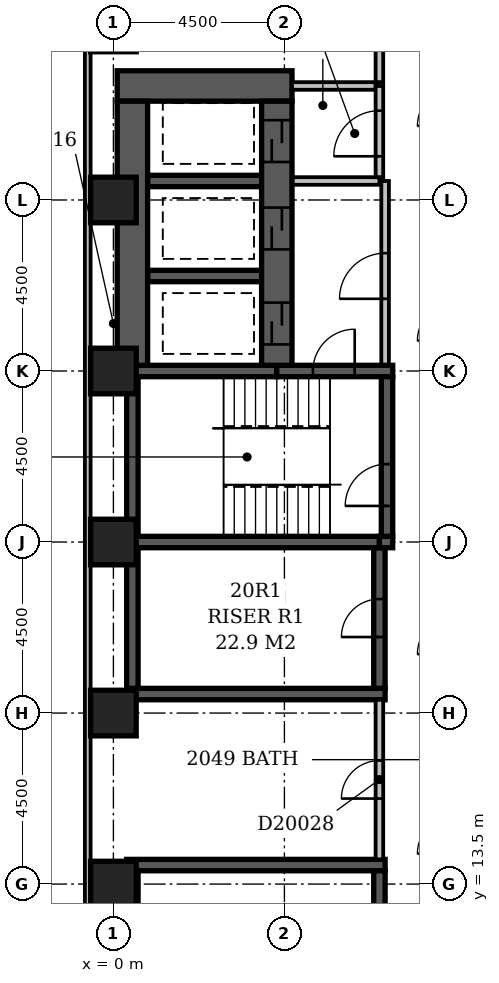
"""IFC4 building model, lengths in metres.
Left out: names, types, materials, properties, quantities, classifications, styles, units other than length and angle.
Written with IfcOpenShell. Run it as: python <this file> out.ifc"""

import sys

from ifc_helpers import new_model, si_unit, direction, frame, frame_2d, origin, origin_2d, place, context, subcontext, project, spatial, rectangle, extrude, element, fill, save


model = new_model("IFC4")
c1 = context("Model", 3, precision=1e-05, world=origin(), true_north=direction((0.0, 1.0)))
c2 = subcontext(c1, "Body", "Model", "MODEL_VIEW")
j1 = project(units=[si_unit("LENGTHUNIT", "METRE"), si_unit("PLANEANGLEUNIT", "RADIAN")], contexts=[c1])
p1 = place(None, origin())
s1 = spatial("IfcSite", under=j1, at=p1, CompositionType="ELEMENT")
p2 = place(p1, origin())
s2 = spatial("IfcBuilding", under=s1, at=p2, CompositionType="ELEMENT")
p3 = place(p2, frame((0.0, 0.0, 83.0)))
s3 = spatial("IfcBuildingStorey", under=s2, at=p3, CompositionType="ELEMENT", Elevation=83.0)
p4 = place(p3, frame((0.1, 34.5, -0.3), z_axis=(0.0, 0.0, 1.0), x_axis=(1.0, 0.0, 0.0)))
e1 = element("IfcWall", 1, at=p4, inside=s3, PredefinedType="SHEAR", context=c2, shape_type="SweptSolid", body=[
    extrude(rectangle(XDim=4.6, YDim=0.8, at=frame_2d((2.3, 0.0))), origin(), (0.0, 0.0, 1.0), 3.6),
])
for number, where, z_axis, x_axis in (
    (2, (0.35, 14.0, -0.3), (0.0, 0.0, 1.0), (1.0, 0.0, 0.0)),
    (3, (0.35, 18.5, -0.3), (0.0, 0.0, 1.0), (1.0, 0.0, 0.0)),
):
    element("IfcWall", number, at=place(p3, frame(where, z_axis=z_axis, x_axis=x_axis)), inside=s3, PredefinedType="SHEAR", context=c2, shape_type="SweptSolid", body=[
        extrude(rectangle(XDim=6.8, YDim=0.3, at=frame_2d((3.4, 0.0))), origin(), (0.0, 0.0, 1.0), 3.6),
    ])
p5 = place(p3, frame((0.35, 22.5, -0.3), z_axis=(0.0, 0.0, 1.0), x_axis=(1.0, 0.0, 0.0)))
e4 = element("IfcWall", 4, at=p5, inside=s3, PredefinedType="SHEAR", context=c2, shape_type="SweptSolid", body=[
    extrude(rectangle(XDim=6.65, YDim=0.3, at=frame_2d((3.325, 0.0))), origin(), (0.0, 0.0, 1.0), 3.6),
])
p6 = place(p3, frame((0.35, 27.0, -0.3), z_axis=(0.0, 0.0, 1.0), x_axis=(1.0, 0.0, 0.0)))
e5 = element("IfcWall", 5, at=p6, inside=s3, PredefinedType="SHEAR", context=c2, shape_type="SweptSolid", body=[
    extrude(rectangle(XDim=3.95, YDim=0.3, at=frame_2d((1.975, 0.0))), origin(), (0.0, 0.0, 1.0), 3.6),
])
for number, where, z_axis, x_axis in (
    (6, (0.5, 10.15, -0.3), (0.0, 0.0, 1.0), (0.0, 1.0, 0.0)),
    (7, (0.5, 18.65, -0.3), (0.0, 0.0, 1.0), (0.0, 1.0, 0.0)),
):
    element("IfcWall", number, at=place(p3, frame(where, z_axis=z_axis, x_axis=x_axis)), inside=s3, PredefinedType="SHEAR", context=c2, shape_type="SweptSolid", body=[
        extrude(rectangle(XDim=3.7, YDim=0.3, at=frame_2d((1.85, 0.0))), origin(), (0.0, 0.0, 1.0), 3.6),
    ])
p7 = place(p3, frame((0.5, 22.65, -0.3), z_axis=(0.0, 0.0, 1.0), x_axis=(0.0, 1.0, 0.0)))
e8 = element("IfcWall", 8, at=p7, inside=s3, PredefinedType="SHEAR", context=c2, shape_type="SweptSolid", body=[
    extrude(rectangle(XDim=4.2, YDim=0.3, at=frame_2d((2.1, 0.0))), origin(), (0.0, 0.0, 1.0), 3.6),
])
p8 = place(p3, frame((0.5, 27.15, -0.3), z_axis=(0.0, 0.0, 1.0), x_axis=(0.0, 1.0, 0.0)))
e9 = element("IfcWall", 9, at=p8, inside=s3, PredefinedType="SHEAR", context=c2, shape_type="SweptSolid", body=[
    extrude(rectangle(XDim=6.95, YDim=0.8, at=frame_2d((3.475, 0.0))), origin(), (0.0, 0.0, 1.0), 3.6),
])
for number, where, z_axis, x_axis in (
    (10, (0.9, 29.5, -0.3), (0.0, 0.0, 1.0), (1.0, 0.0, 0.0)),
    (11, (0.9, 32.0, -0.3), (0.0, 0.0, 1.0), (1.0, 0.0, 0.0)),
):
    element("IfcWall", number, at=place(p3, frame(where, z_axis=z_axis, x_axis=x_axis)), inside=s3, PredefinedType="SHEAR", context=c2, shape_type="SweptSolid", body=[
        extrude(rectangle(XDim=3.0, YDim=0.3, at=frame_2d((1.5, 0.0))), origin(), (0.0, 0.0, 1.0), 3.6),
    ])
p9 = place(p3, frame((4.3, 27.0, -0.3), z_axis=(0.0, 0.0, 1.0), x_axis=(1.0, 0.0, 0.0)))
e12 = element("IfcWall", 12, at=p9, inside=s3, PredefinedType="SHEAR", context=c2, shape_type="SweptSolid", body=[
    extrude(rectangle(XDim=3.05, YDim=0.3, at=frame_2d((1.525, 0.0))), origin(), (0.0, 0.0, 1.0), 3.6),
])
p10 = place(p9, frame((0.95, 0.0, 0.3)))
e13 = element("IfcOpeningElement", 13, at=p10, cuts=e12, PredefinedType="OPENING", context=c2, shape_type="SweptSolid", body=[
    extrude(rectangle(XDim=1.1, YDim=2.1, at=frame_2d((0.55, 1.05))), frame((0.0, 0.162, 0.0), z_axis=(0.0, -1.0, 0.0), x_axis=(1.0, 0.0, 0.0)), (0.0, 0.0, 1.0), 0.324),
])
p11 = place(p3, frame((4.3, 27.15, -0.3), z_axis=(0.0, 0.0, 1.0), x_axis=(0.0, 1.0, 0.0)))
e14 = element("IfcWall", 14, at=p11, inside=s3, PredefinedType="SHEAR", context=c2, shape_type="SweptSolid", body=[
    extrude(rectangle(XDim=6.95, YDim=0.8, at=frame_2d((3.475, 0.0))), origin(), (0.0, 0.0, 1.0), 3.6),
])
p12 = place(p11, frame((3.05, 0.0, 0.3)))
e15 = element("IfcOpeningElement", 15, at=p12, cuts=e14, PredefinedType="OPENING", context=c2, shape_type="SweptSolid", body=[
    extrude(rectangle(XDim=1.1, YDim=2.1, at=frame_2d((0.55, 1.05))), frame((0.0, 0.412, 0.0), z_axis=(0.0, -1.0, 0.0), x_axis=(1.0, 0.0, 0.0)), (0.0, 0.0, 1.0), 0.824),
])
p13 = place(p11, frame((0.55, 0.0, 0.3)))
e16 = element("IfcOpeningElement", 16, at=p13, cuts=e14, PredefinedType="OPENING", context=c2, shape_type="SweptSolid", body=[
    extrude(rectangle(XDim=1.1, YDim=2.1, at=frame_2d((0.55, 1.05))), frame((0.0, 0.412, 0.0), z_axis=(0.0, -1.0, 0.0), x_axis=(1.0, 0.0, 0.0)), (0.0, 0.0, 1.0), 0.824),
])
p14 = place(p11, frame((5.35, 0.0, 0.3)))
e17 = element("IfcOpeningElement", 17, at=p14, cuts=e14, PredefinedType="OPENING", context=c2, shape_type="SweptSolid", body=[
    extrude(rectangle(XDim=1.1, YDim=2.1, at=frame_2d((0.55, 1.05))), frame((0.0, 0.412, 0.0), z_axis=(0.0, -1.0, 0.0), x_axis=(1.0, 0.0, 0.0)), (0.0, 0.0, 1.0), 0.824),
])
p15 = place(p3, frame((7.0, 10.15, -0.3), z_axis=(0.0, 0.0, 1.0), x_axis=(0.0, 1.0, 0.0)))
e18 = element("IfcWall", 18, at=p15, inside=s3, PredefinedType="SHEAR", context=c2, shape_type="SweptSolid", body=[
    extrude(rectangle(XDim=3.7, YDim=0.3, at=frame_2d((1.85, 0.0))), origin(), (0.0, 0.0, 1.0), 3.6),
])
p16 = place(p15, frame((1.35, 0.0, 0.3)))
e19 = element("IfcOpeningElement", 19, at=p16, cuts=e18, PredefinedType="OPENING", context=c2, shape_type="SweptSolid", body=[
    extrude(rectangle(XDim=1.0, YDim=2.1, at=frame_2d((0.5, 1.05))), frame((0.0, 0.162, 0.0), z_axis=(0.0, -1.0, 0.0), x_axis=(1.0, 0.0, 0.0)), (0.0, 0.0, 1.0), 0.324),
])
p17 = place(p3, frame((7.0, 18.65, -0.3), z_axis=(0.0, 0.0, 1.0), x_axis=(0.0, 1.0, 0.0)))
e20 = element("IfcWall", 20, at=p17, inside=s3, PredefinedType="SHEAR", context=c2, shape_type="SweptSolid", body=[
    extrude(rectangle(XDim=3.7, YDim=0.3, at=frame_2d((1.85, 0.0))), origin(), (0.0, 0.0, 1.0), 3.6),
])
p18 = place(p17, frame((1.35, 0.0, 0.3)))
e21 = element("IfcOpeningElement", 21, at=p18, cuts=e20, PredefinedType="OPENING", context=c2, shape_type="SweptSolid", body=[
    extrude(rectangle(XDim=1.0, YDim=2.1, at=frame_2d((0.5, 1.05))), frame((0.0, 0.162, 0.0), z_axis=(0.0, -1.0, 0.0), x_axis=(1.0, 0.0, 0.0)), (0.0, 0.0, 1.0), 0.324),
])
p19 = place(p3, frame((7.0, 22.5, -0.3), z_axis=(0.0, 0.0, 1.0), x_axis=(1.0, 0.0, 0.0)))
e22 = element("IfcWall", 22, at=p19, inside=s3, PredefinedType="SHEAR", context=c2, shape_type="SweptSolid", body=[
    extrude(rectangle(XDim=0.35, YDim=0.3, at=frame_2d((0.175, 0.0))), origin(), (0.0, 0.0, 1.0), 3.6),
])
p20 = place(p3, frame((7.2, 22.65, -0.3), z_axis=(0.0, 0.0, 1.0), x_axis=(0.0, 1.0, 0.0)))
e23 = element("IfcWall", 23, at=p20, inside=s3, PredefinedType="SHEAR", context=c2, shape_type="SweptSolid", body=[
    extrude(rectangle(XDim=4.2, YDim=0.3, at=frame_2d((2.1, 0.0))), origin(), (0.0, 0.0, 1.0), 3.6),
])
p21 = place(p20, frame((0.8, 0.0, 0.3)))
e24 = element("IfcOpeningElement", 24, at=p21, cuts=e23, PredefinedType="OPENING", context=c2, shape_type="SweptSolid", body=[
    extrude(rectangle(XDim=1.1, YDim=2.1, at=frame_2d((0.55, 1.05))), frame((0.0, 0.162, 0.0), z_axis=(0.0, -1.0, 0.0), x_axis=(1.0, 0.0, 0.0)), (0.0, 0.0, 1.0), 0.324),
])
for number, where, z_axis, x_axis in (
    (25, (0.0, 13.5, -0.3), (0.0, 0.0, 1.0), (1.0, 0.0, 0.0)),
    (26, (0.0, 18.0, -0.3), (0.0, 0.0, 1.0), (1.0, 0.0, 0.0)),
    (27, (0.0, 22.5, -0.3), (0.0, 0.0, 1.0), (1.0, 0.0, 0.0)),
    (28, (0.0, 27.0, -0.3), (0.0, 0.0, 1.0), (1.0, 0.0, 0.0)),
    (29, (0.0, 31.5, -0.3), (0.0, 0.0, 1.0), (1.0, 0.0, 0.0)),
):
    element("IfcColumn", number, at=place(p3, frame(where, z_axis=z_axis, x_axis=x_axis)), inside=s3, PredefinedType="COLUMN", context=c2, shape_type="SweptSolid", body=[
        extrude(rectangle(XDim=1.2, YDim=1.2, at=origin_2d()), origin(), (0.0, 0.0, 1.0), 3.6),
    ])
p22 = place(p3, frame((-0.675, 59.1, 0.0), z_axis=(0.0, 0.0, 1.0), x_axis=(0.0, -1.0, 0.0)))
e30 = element("IfcWall", 30, at=p22, inside=s3, PredefinedType="STANDARD", context=c2, shape_type="SweptSolid", body=[
    extrude(rectangle(XDim=55.35, YDim=0.15, at=frame_2d((27.675, 0.0))), origin(), (0.0, 0.0, 1.0), 2.7),
])
p23 = place(p22, frame((10.65, 0.0, 0.6)))
e31 = element("IfcOpeningElement", 31, at=p23, cuts=e30, PredefinedType="OPENING", context=c2, shape_type="SweptSolid", body=[
    extrude(rectangle(XDim=2.4, YDim=1.8, at=frame_2d((1.2, 0.9))), frame((0.0, 0.087, 0.0), z_axis=(0.0, -1.0, 0.0), x_axis=(1.0, 0.0, 0.0)), (0.0, 0.0, 1.0), 0.174),
])
p24 = place(p22, frame((15.15, 0.0, 0.6)))
e32 = element("IfcOpeningElement", 32, at=p24, cuts=e30, PredefinedType="OPENING", context=c2, shape_type="SweptSolid", body=[
    extrude(rectangle(XDim=2.4, YDim=1.8, at=frame_2d((1.2, 0.9))), frame((0.0, 0.087, 0.0), z_axis=(0.0, -1.0, 0.0), x_axis=(1.0, 0.0, 0.0)), (0.0, 0.0, 1.0), 0.174),
])
p25 = place(p22, frame((19.41, 0.0, 0.6)))
e33 = element("IfcOpeningElement", 33, at=p25, cuts=e30, PredefinedType="OPENING", context=c2, shape_type="SweptSolid", body=[
    extrude(rectangle(XDim=1.8, YDim=1.8, at=frame_2d((0.9, 0.9))), frame((0.0, 0.087, 0.0), z_axis=(0.0, -1.0, 0.0), x_axis=(1.0, 0.0, 0.0)), (0.0, 0.0, 1.0), 0.174),
])
p26 = place(p3, frame((4.72, 32.0, 0.0), z_axis=(0.0, 0.0, 1.0), x_axis=(1.0, 0.0, 0.0)))
e34 = element("IfcWall", 34, at=p26, inside=s3, PredefinedType="PARTITIONING", context=c2, shape_type="SweptSolid", body=[
    extrude(rectangle(XDim=2.28, YDim=0.2, at=frame_2d((1.14, 0.0))), origin(), (0.0, 0.0, 1.0), 3.3),
])
p27 = place(p3, frame((7.0, 32.1, 0.0), z_axis=(0.0, 0.0, 1.0), x_axis=(0.0, 1.0, 0.0)))
e35 = element("IfcWall", 35, at=p27, inside=s3, PredefinedType="PARTITIONING", context=c2, shape_type="SweptSolid", body=[
    extrude(rectangle(XDim=2.4, YDim=0.2, at=frame_2d((1.2, 0.0))), origin(), (0.0, 0.0, 1.0), 3.3),
])
p28 = place(p27, frame((0.55, 0.0, 0.0)))
e36 = element("IfcOpeningElement", 36, at=p28, cuts=e35, PredefinedType="OPENING", context=c2, shape_type="SweptSolid", body=[
    extrude(rectangle(XDim=1.2, YDim=2.1, at=frame_2d((0.6, 1.05))), frame((0.0, 0.112, 0.0), z_axis=(0.0, -1.0, 0.0), x_axis=(1.0, 0.0, 0.0)), (0.0, 0.0, 1.0), 0.224),
])
p29 = place(p3, frame((4.7, 34.5, 0.0), z_axis=(0.0, 0.0, 1.0), x_axis=(1.0, 0.0, 0.0)))
e37 = element("IfcWall", 37, at=p29, inside=s3, PredefinedType="PARTITIONING", context=c2, shape_type="SweptSolid", body=[
    extrude(rectangle(XDim=2.2, YDim=0.2, at=frame_2d((1.1, 0.0))), origin(), (0.0, 0.0, 1.0), 3.3),
])
p30 = place(p3, frame((7.15, 27.17, 0.0), z_axis=(0.0, 0.0, 1.0), x_axis=(0.0, 1.0, 0.0)))
e38 = element("IfcWall", 38, at=p30, inside=s3, PredefinedType="PARTITIONING", context=c2, shape_type="SweptSolid", body=[
    extrude(rectangle(XDim=4.83, YDim=0.2, at=frame_2d((2.415, 0.0))), origin(), (0.0, 0.0, 1.0), 3.3),
])
p31 = place(p30, frame((1.73, 0.0, 0.0)))
e39 = element("IfcOpeningElement", 39, at=p31, cuts=e38, PredefinedType="OPENING", context=c2, shape_type="SweptSolid", body=[
    extrude(rectangle(XDim=1.2, YDim=2.1, at=frame_2d((0.6, 1.05))), frame((0.0, 0.112, 0.0), z_axis=(0.0, -1.0, 0.0), x_axis=(1.0, 0.0, 0.0)), (0.0, 0.0, 1.0), 0.224),
])
p32 = place(p3, frame((7.0, 14.15, 0.0), z_axis=(0.0, 0.0, 1.0), x_axis=(0.0, 1.0, 0.0)))
e40 = element("IfcWall", 40, at=p32, inside=s3, PredefinedType="PARTITIONING", context=c2, shape_type="SweptSolid", body=[
    extrude(rectangle(XDim=4.2, YDim=0.2, at=frame_2d((2.1, 0.0))), origin(), (0.0, 0.0, 1.0), 3.3),
])
p33 = place(p32, frame((1.6, 0.0, 0.0)))
e41 = element("IfcOpeningElement", 41, at=p33, cuts=e40, PredefinedType="OPENING", context=c2, shape_type="SweptSolid", body=[
    extrude(rectangle(XDim=1.0, YDim=2.1, at=frame_2d((0.5, 1.05))), frame((0.0, 0.112, 0.0), z_axis=(0.0, -1.0, 0.0), x_axis=(1.0, 0.0, 0.0)), (0.0, 0.0, 1.0), 0.224),
])
p34 = place(p3, frame((7.0, 34.6, 0.0), z_axis=(0.0, 0.0, 1.0), x_axis=(0.0, 1.0, 0.0)))
e42 = element("IfcWall", 42, at=p34, inside=s3, PredefinedType="PARTITIONING", context=c2, shape_type="SweptSolid", body=[
    extrude(rectangle(XDim=14.8, YDim=0.2, at=frame_2d((7.4, 0.0))), origin(), (0.0, 0.0, 1.0), 3.3),
])
p35 = place(p34, frame((6.95, 0.0, 0.0)))
e43 = element("IfcOpeningElement", 43, at=p35, cuts=e42, PredefinedType="OPENING", context=c2, shape_type="SweptSolid", body=[
    extrude(rectangle(XDim=0.9, YDim=2.1, at=frame_2d((0.45, 1.05))), frame((0.0, 0.112, 0.0), z_axis=(0.0, -1.0, 0.0), x_axis=(1.0, 0.0, 0.0)), (0.0, 0.0, 1.0), 0.224),
])
p36 = place(p31, origin())
e44 = element("IfcDoor", 44, at=p36, inside=s3, OperationType="SINGLE_SWING_LEFT", PredefinedType="DOOR", context=c2, shape_type="SweptSolid", body=[
    extrude(rectangle(XDim=1.2, YDim=2.1, at=frame_2d((0.6, 1.05))), frame((0.0, 0.025, 0.0), z_axis=(0.0, -1.0, 0.0), x_axis=(1.0, 0.0, 0.0)), (0.0, 0.0, 1.0), 0.05),
])
fill(e39, e44)
p37 = place(p12, origin())
e45 = element("IfcDoor", 45, at=p37, inside=s3, OperationType="SLIDING_TO_LEFT", PredefinedType="DOOR", context=c2, shape_type="SweptSolid", body=[
    extrude(rectangle(XDim=1.1, YDim=2.1, at=frame_2d((0.55, 1.05))), frame((0.0, 0.025, 0.0), z_axis=(0.0, -1.0, 0.0), x_axis=(1.0, 0.0, 0.0)), (0.0, 0.0, 1.0), 0.05),
])
fill(e15, e45)
p38 = place(p13, origin())
e46 = element("IfcDoor", 46, at=p38, inside=s3, OperationType="SLIDING_TO_LEFT", PredefinedType="DOOR", context=c2, shape_type="SweptSolid", body=[
    extrude(rectangle(XDim=1.1, YDim=2.1, at=frame_2d((0.55, 1.05))), frame((0.0, 0.025, 0.0), z_axis=(0.0, -1.0, 0.0), x_axis=(1.0, 0.0, 0.0)), (0.0, 0.0, 1.0), 0.05),
])
fill(e16, e46)
p39 = place(p28, origin())
e47 = element("IfcDoor", 47, at=p39, inside=s3, OperationType="SINGLE_SWING_LEFT", PredefinedType="DOOR", context=c2, shape_type="SweptSolid", body=[
    extrude(rectangle(XDim=1.2, YDim=2.1, at=frame_2d((0.6, 1.05))), frame((0.0, 0.025, 0.0), z_axis=(0.0, -1.0, 0.0), x_axis=(1.0, 0.0, 0.0)), (0.0, 0.0, 1.0), 0.05),
])
fill(e36, e47)
p40 = place(p14, origin())
e48 = element("IfcDoor", 48, at=p40, inside=s3, OperationType="SLIDING_TO_LEFT", PredefinedType="DOOR", context=c2, shape_type="SweptSolid", body=[
    extrude(rectangle(XDim=1.1, YDim=2.1, at=frame_2d((0.55, 1.05))), frame((0.0, 0.025, 0.0), z_axis=(0.0, -1.0, 0.0), x_axis=(1.0, 0.0, 0.0)), (0.0, 0.0, 1.0), 0.05),
])
fill(e17, e48)
p41 = place(p18, origin())
e49 = element("IfcDoor", 49, at=p41, inside=s3, OperationType="SINGLE_SWING_LEFT", PredefinedType="DOOR", context=c2, shape_type="SweptSolid", body=[
    extrude(rectangle(XDim=1.0, YDim=2.1, at=frame_2d((0.5, 1.05))), frame((0.0, 0.025, 0.0), z_axis=(0.0, -1.0, 0.0), x_axis=(1.0, 0.0, 0.0)), (0.0, 0.0, 1.0), 0.05),
])
fill(e21, e49)
p42 = place(p10, frame((1.1, 0.0, 0.0), z_axis=(0.0, 0.0, 1.0), x_axis=(-1.0, 0.0, 0.0)))
e50 = element("IfcDoor", 50, at=p42, inside=s3, OperationType="SINGLE_SWING_LEFT", PredefinedType="DOOR", context=c2, shape_type="SweptSolid", body=[
    extrude(rectangle(XDim=1.1, YDim=2.1, at=frame_2d((0.55, 1.05))), frame((0.0, 0.025, 0.0), z_axis=(0.0, -1.0, 0.0), x_axis=(1.0, 0.0, 0.0)), (0.0, 0.0, 1.0), 0.05),
])
fill(e13, e50)
p43 = place(p21, origin())
e51 = element("IfcDoor", 51, at=p43, inside=s3, OperationType="SINGLE_SWING_LEFT", PredefinedType="DOOR", context=c2, shape_type="SweptSolid", body=[
    extrude(rectangle(XDim=1.1, YDim=2.1, at=frame_2d((0.55, 1.05))), frame((0.0, 0.025, 0.0), z_axis=(0.0, -1.0, 0.0), x_axis=(1.0, 0.0, 0.0)), (0.0, 0.0, 1.0), 0.05),
])
fill(e24, e51)
p44 = place(p33, origin())
e52 = element("IfcDoor", 52, at=p44, inside=s3, OperationType="SINGLE_SWING_LEFT", PredefinedType="DOOR", context=c2, shape_type="SweptSolid", body=[
    extrude(rectangle(XDim=1.0, YDim=2.1, at=frame_2d((0.5, 1.05))), frame((0.0, 0.025, 0.0), z_axis=(0.0, -1.0, 0.0), x_axis=(1.0, 0.0, 0.0)), (0.0, 0.0, 1.0), 0.05),
])
fill(e41, e52)
save(model, sys.argv[1])
